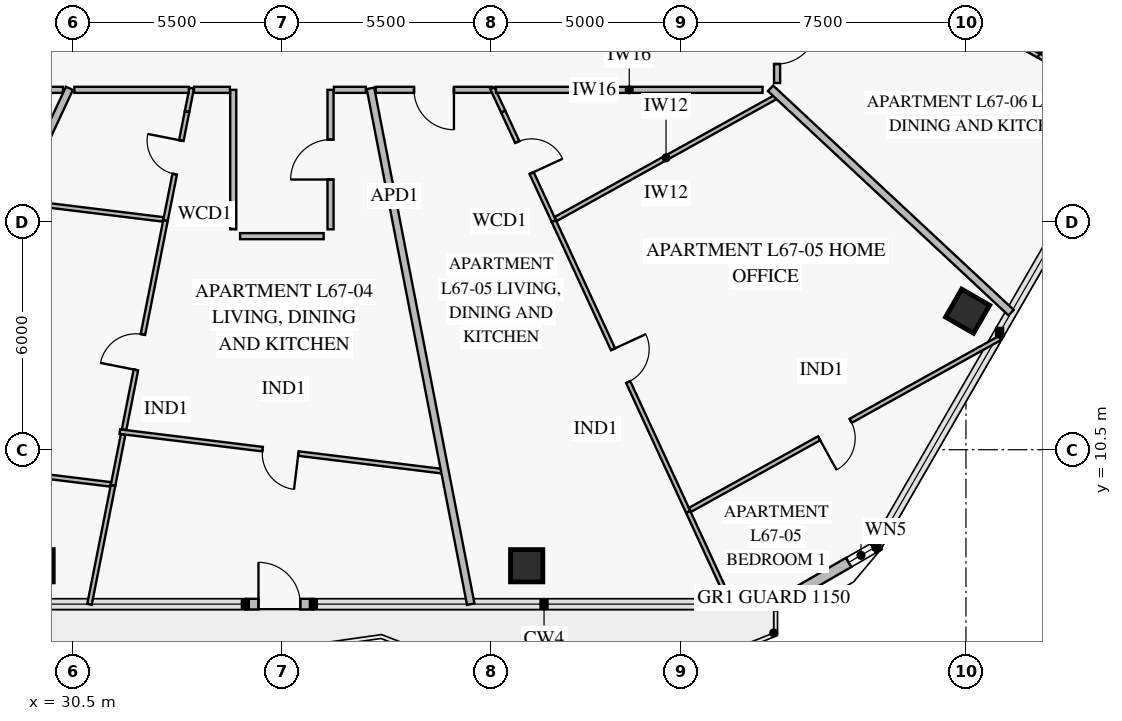
"""IFC4 building model, lengths in metres.
Left out: names, types, materials, properties, quantities, classifications, styles, units other than length and angle.
Written with IfcOpenShell. Run it as: python <this file> out.ifc"""

import sys

from ifc_helpers import new_model, si_unit, direction, frame, frame_2d, origin, origin_2d, place, context, subcontext, project, spatial, rectangle, extrude, element, fill, save


model = new_model("IFC4")
c1 = context("Model", 3, precision=1e-05, world=origin(), true_north=direction((0.0, 1.0)))
c2 = subcontext(c1, "Body", "Model", "MODEL_VIEW")
j1 = project(units=[si_unit("LENGTHUNIT", "METRE"), si_unit("PLANEANGLEUNIT", "RADIAN")], contexts=[c1])
p1 = place(None, origin())
s1 = spatial("IfcSite", under=j1, at=p1, CompositionType="ELEMENT")
p2 = place(p1, origin())
s2 = spatial("IfcBuilding", under=s1, at=p2, CompositionType="ELEMENT")
p3 = place(p2, frame((0.0, 0.0, 265.4)))
s3 = spatial("IfcBuildingStorey", under=s2, at=p3, CompositionType="ELEMENT", Elevation=265.4)
for number, where, z_axis, x_axis in (
    (1, (29.559, 7.446, 0.0), (0.0, 0.0, 1.0), (1.0, 0.0, 0.0)),
    (2, (42.441, 7.446, 0.0), (0.0, 0.0, 1.0), (1.0, 0.0, 0.0)),
    (3, (54.044, 14.145, 0.0), (0.0, 0.0, 1.0), (0.5, 0.866, 0.0)),
):
    element("IfcColumn", number, at=place(p3, frame(where, z_axis=z_axis, x_axis=x_axis)), inside=s3, PredefinedType="COLUMN", context=c2, shape_type="SweptSolid", body=[
        extrude(rectangle(XDim=0.85, YDim=0.85, at=origin_2d()), origin(), (0.0, 0.0, 1.0), 3.55),
    ])
p4 = place(p3, frame((51.715, 7.996, 0.0), z_axis=(0.0, 0.0, 1.0), x_axis=(-0.866028773314, -0.499994163758, 0.0)))
e4 = element("IfcWall", 4, at=p4, inside=s3, PredefinedType="SOLIDWALL", context=c2, shape_type="SweptSolid", body=[
    extrude(rectangle(XDim=3.215, YDim=0.28, at=frame_2d((1.607, 0.0))), origin(), (0.0, 0.0, 1.0), 3.55),
])
p5 = place(p4, frame((0.176, 0.0, 0.85)))
e5 = element("IfcOpeningElement", 5, at=p5, cuts=e4, PredefinedType="OPENING", context=c2, shape_type="SweptSolid", body=[
    extrude(rectangle(XDim=0.75, YDim=1.5, at=frame_2d((0.375, 0.75))), frame((0.0, 0.152, 0.0), z_axis=(0.0, -1.0, 0.0), x_axis=(1.0, 0.0, 0.0)), (0.0, 0.0, 1.0), 0.304),
])
p6 = place(p3, frame((36.829, 6.436, 0.0), z_axis=(0.0, 0.0, 1.0), x_axis=(-1.0, 0.0, 0.0)))
e6 = element("IfcWall", 6, at=p6, inside=s3, PredefinedType="SOLIDWALL", context=c2, shape_type="SweptSolid", body=[
    extrude(rectangle(XDim=1.79, YDim=0.28, at=frame_2d((0.895, 0.0))), origin(), (0.0, 0.0, 1.0), 3.55),
])
p7 = place(p6, frame((0.345, 0.0, 0.0)))
e7 = element("IfcOpeningElement", 7, at=p7, cuts=e6, PredefinedType="OPENING", context=c2, shape_type="SweptSolid", body=[
    extrude(rectangle(XDim=1.1, YDim=2.2, at=frame_2d((0.55, 1.1))), frame((0.0, 0.152, 0.0), z_axis=(0.0, -1.0, 0.0), x_axis=(1.0, 0.0, 0.0)), (0.0, 0.0, 1.0), 0.304),
])
p8 = place(p3, frame((23.15, 19.97, 0.0), z_axis=(0.0, 0.0, 1.0), x_axis=(1.0, 0.0, 0.0)))
e8 = element("IfcWall", 8, at=p8, inside=s3, PredefinedType="PARTITIONING", context=c2, shape_type="SweptSolid", body=[
    extrude(rectangle(XDim=7.09, YDim=0.16, at=frame_2d((3.545, 0.0))), origin(), (0.0, 0.0, 1.0), 2.95),
])
p9 = place(p8, frame((3.02, 0.0, 0.0)))
e9 = element("IfcOpeningElement", 9, at=p9, cuts=e8, PredefinedType="OPENING", context=c2, shape_type="SweptSolid", body=[
    extrude(rectangle(XDim=1.05, YDim=2.15, at=frame_2d((0.525, 1.075))), frame((0.0, 0.092, 0.0), z_axis=(0.0, -1.0, 0.0), x_axis=(1.0, 0.0, 0.0)), (0.0, 0.0, 1.0), 0.184),
])
p10 = place(p3, frame((31.735, 10.976, 0.0), z_axis=(0.0, 0.0, 1.0), x_axis=(0.992544489296, -0.121882881359, 0.0)))
e10 = element("IfcWall", 10, at=p10, inside=s3, PredefinedType="PARTITIONING", context=c2, shape_type="SweptSolid", body=[
    extrude(rectangle(XDim=8.519, YDim=0.12, at=frame_2d((4.26, 0.0))), origin(), (0.0, 0.0, 1.0), 3.55),
])
p11 = place(p10, frame((3.784, 0.0, 0.0)))
e11 = element("IfcOpeningElement", 11, at=p11, cuts=e10, PredefinedType="OPENING", context=c2, shape_type="SweptSolid", body=[
    extrude(rectangle(XDim=0.95, YDim=2.1, at=frame_2d((0.475, 1.05))), frame((0.0, 0.072, 0.0), z_axis=(0.0, -1.0, 0.0), x_axis=(1.0, 0.0, 0.0)), (0.0, 0.0, 1.0), 0.144),
])
p12 = place(p3, frame((33.505, 19.4, 0.0), z_axis=(0.0, 0.0, 1.0), x_axis=(-0.194223379767, -0.980957327692, 0.0)))
e12 = element("IfcWall", 12, at=p12, inside=s3, PredefinedType="PARTITIONING", context=c2, shape_type="SweptSolid", body=[
    extrude(rectangle(XDim=2.927, YDim=0.12, at=frame_2d((1.464, 0.0))), origin(), (0.0, 0.0, 1.0), 3.55),
])
p13 = place(p12, frame((0.78, 0.0, 0.0)))
e13 = element("IfcOpeningElement", 13, at=p13, cuts=e12, PredefinedType="OPENING", context=c2, shape_type="SweptSolid", body=[
    extrude(rectangle(XDim=0.9, YDim=2.1, at=frame_2d((0.45, 1.05))), frame((0.0, 0.072, 0.0), z_axis=(0.0, -1.0, 0.0), x_axis=(1.0, 0.0, 0.0)), (0.0, 0.0, 1.0), 0.144),
])
p14 = place(p3, frame((32.937, 16.528, 0.0), z_axis=(0.0, 0.0, 1.0), x_axis=(-0.194255896186, -0.980950889085, 0.0)))
e14 = element("IfcWall", 14, at=p14, inside=s3, PredefinedType="PARTITIONING", context=c2, shape_type="SweptSolid", body=[
    extrude(rectangle(XDim=5.604, YDim=0.12, at=frame_2d((2.802, 0.0))), origin(), (0.0, 0.0, 1.0), 3.15),
])
p15 = place(p14, frame((3.054, 0.0, 0.0)))
e15 = element("IfcOpeningElement", 15, at=p15, cuts=e14, PredefinedType="OPENING", context=c2, shape_type="SweptSolid", body=[
    extrude(rectangle(XDim=0.95, YDim=2.1, at=frame_2d((0.475, 1.05))), frame((0.0, 0.072, 0.0), z_axis=(0.0, -1.0, 0.0), x_axis=(1.0, 0.0, 0.0)), (0.0, 0.0, 1.0), 0.144),
])
p16 = place(p3, frame((31.822, 10.897, 0.0), z_axis=(0.0, 0.0, 1.0), x_axis=(-0.194227600247, -0.980956492054, 0.0)))
e16 = element("IfcWall", 16, at=p16, inside=s3, PredefinedType="PARTITIONING", context=c2, shape_type="SweptSolid", body=[
    extrude(rectangle(XDim=1.368, YDim=0.12, at=frame_2d((0.684, 0.0))), origin(), (0.0, 0.0, 1.0), 3.55),
])
p17 = place(p3, frame((25.985, 10.265, 0.0), z_axis=(0.0, 0.0, 1.0), x_axis=(0.992542241385, -0.121901185661, 0.0)))
e17 = element("IfcWall", 17, at=p17, inside=s3, PredefinedType="PARTITIONING", context=c2, shape_type="SweptSolid", body=[
    extrude(rectangle(XDim=5.55, YDim=0.12, at=frame_2d((2.775, 0.0))), origin(), (0.0, 0.0, 1.0), 2.95),
])
p18 = place(p17, frame((2.384, 0.0, 0.0)))
e18 = element("IfcOpeningElement", 18, at=p18, cuts=e17, PredefinedType="OPENING", context=c2, shape_type="SweptSolid", body=[
    extrude(rectangle(XDim=0.95, YDim=2.1, at=frame_2d((0.475, 1.05))), frame((0.0, 0.072, 0.0), z_axis=(0.0, -1.0, 0.0), x_axis=(1.0, 0.0, 0.0)), (0.0, 0.0, 1.0), 0.144),
])
p19 = place(p3, frame((37.28, 16.3, 0.0), z_axis=(0.0, 0.0, 1.0), x_axis=(0.0, 1.0, 0.0)))
e19 = element("IfcWall", 19, at=p19, inside=s3, PredefinedType="PARTITIONING", context=c2, shape_type="SweptSolid", body=[
    extrude(rectangle(XDim=3.67, YDim=0.16, at=frame_2d((1.835, 0.0))), origin(), (0.0, 0.0, 1.0), 3.55),
])
p20 = place(p19, frame((1.31, 0.0, 0.0)))
e20 = element("IfcOpeningElement", 20, at=p20, cuts=e19, PredefinedType="OPENING", context=c2, shape_type="SweptSolid", body=[
    extrude(rectangle(XDim=1.05, YDim=2.15, at=frame_2d((0.525, 1.075))), frame((0.0, 0.092, 0.0), z_axis=(0.0, -1.0, 0.0), x_axis=(1.0, 0.0, 0.0)), (0.0, 0.0, 1.0), 0.184),
])
p21 = place(p3, frame((41.822, 19.4, 0.0), z_axis=(0.0, 0.0, 1.0), x_axis=(0.419438119549, -0.907783930167, 0.0)))
e21 = element("IfcWall", 21, at=p21, inside=s3, PredefinedType="PARTITIONING", context=c2, shape_type="SweptSolid", body=[
    extrude(rectangle(XDim=3.178, YDim=0.12, at=frame_2d((1.589, 0.0))), origin(), (0.0, 0.0, 1.0), 3.55),
])
p22 = place(p21, frame((0.885, 0.0, 0.0)))
e22 = element("IfcOpeningElement", 22, at=p22, cuts=e21, PredefinedType="OPENING", context=c2, shape_type="SweptSolid", body=[
    extrude(rectangle(XDim=0.9, YDim=2.1, at=frame_2d((0.45, 1.05))), frame((0.0, 0.072, 0.0), z_axis=(0.0, -1.0, 0.0), x_axis=(1.0, 0.0, 0.0)), (0.0, 0.0, 1.0), 0.144),
])
p23 = place(p3, frame((43.155, 16.515, 0.0), z_axis=(0.0, 0.0, 1.0), x_axis=(0.419453006553, -0.907777051535, 0.0)))
e23 = element("IfcWall", 23, at=p23, inside=s3, PredefinedType="PARTITIONING", context=c2, shape_type="SweptSolid", body=[
    extrude(rectangle(XDim=8.43, YDim=0.12, at=frame_2d((4.215, 0.0))), origin(), (0.0, 0.0, 1.0), 2.93),
])
p24 = place(p23, frame((3.715, 0.0, 0.0)))
e24 = element("IfcOpeningElement", 24, at=p24, cuts=e23, PredefinedType="OPENING", context=c2, shape_type="SweptSolid", body=[
    extrude(rectangle(XDim=0.95, YDim=2.1, at=frame_2d((0.475, 1.05))), frame((0.0, 0.072, 0.0), z_axis=(0.0, -1.0, 0.0), x_axis=(1.0, 0.0, 0.0)), (0.0, 0.0, 1.0), 0.144),
])
p25 = place(p3, frame((46.74, 8.918, 0.0), z_axis=(0.0, 0.0, 1.0), x_axis=(0.874617638419, 0.484813352298, 0.0)))
e25 = element("IfcWall", 25, at=p25, inside=s3, PredefinedType="PARTITIONING", context=c2, shape_type="SweptSolid", body=[
    extrude(rectangle(XDim=9.323, YDim=0.12, at=frame_2d((4.661, 0.0))), origin(), (0.0, 0.0, 1.0), 3.55),
])
p26 = place(p25, frame((3.882, 0.0, 0.0)))
e26 = element("IfcOpeningElement", 26, at=p26, cuts=e25, PredefinedType="OPENING", context=c2, shape_type="SweptSolid", body=[
    extrude(rectangle(XDim=0.95, YDim=2.1, at=frame_2d((0.475, 1.05))), frame((0.0, 0.072, 0.0), z_axis=(0.0, -1.0, 0.0), x_axis=(1.0, 0.0, 0.0)), (0.0, 0.0, 1.0), 0.144),
])
p27 = place(p3, frame((38.468, 19.97, 0.0), z_axis=(0.0, 0.0, 1.0), x_axis=(1.0, 0.0, 0.0)))
e27 = element("IfcWall", 27, at=p27, inside=s3, PredefinedType="PARTITIONING", context=c2, shape_type="SweptSolid", body=[
    extrude(rectangle(XDim=3.069, YDim=0.16, at=frame_2d((1.534, 0.0))), origin(), (0.0, 0.0, 1.0), 2.95),
])
p28 = place(p27, frame((1.009, 0.0, 0.0)))
e28 = element("IfcOpeningElement", 28, at=p28, cuts=e27, PredefinedType="OPENING", context=c2, shape_type="SweptSolid", body=[
    extrude(rectangle(XDim=1.05, YDim=2.15, at=frame_2d((0.525, 1.075))), frame((0.0, 0.092, 0.0), z_axis=(0.0, -1.0, 0.0), x_axis=(1.0, 0.0, 0.0)), (0.0, 0.0, 1.0), 0.184),
])
p29 = place(p3, frame((48.472, 25.03, 0.0), z_axis=(0.0, 0.0, 1.0), x_axis=(0.872916935633, -0.487868858901, 0.0)))
e29 = element("IfcWall", 29, at=p29, inside=s3, PredefinedType="PARTITIONING", context=c2, shape_type="SweptSolid", body=[
    extrude(rectangle(XDim=8.524, YDim=0.12, at=frame_2d((4.262, 0.0))), origin(), (0.0, 0.0, 1.0), 3.15),
])
p30 = place(p29, frame((3.762, 0.0, 0.0)))
e30 = element("IfcOpeningElement", 30, at=p30, cuts=e29, PredefinedType="OPENING", context=c2, shape_type="SweptSolid", body=[
    extrude(rectangle(XDim=0.95, YDim=2.1, at=frame_2d((0.475, 1.05))), frame((0.0, 0.072, 0.0), z_axis=(0.0, -1.0, 0.0), x_axis=(1.0, 0.0, 0.0)), (0.0, 0.0, 1.0), 0.144),
])
p31 = place(p3, frame((55.92, 20.945, 0.0), z_axis=(0.0, 0.0, 1.0), x_axis=(0.422606705523, 0.9063131757, 0.0)))
e31 = element("IfcWall", 31, at=p31, inside=s3, PredefinedType="PARTITIONING", context=c2, shape_type="SweptSolid", body=[
    extrude(rectangle(XDim=8.871, YDim=0.12, at=frame_2d((4.435, 0.0))), origin(), (0.0, 0.0, 1.0), 2.95),
])
p32 = place(p31, frame((3.876, 0.0, 0.0)))
e32 = element("IfcOpeningElement", 32, at=p32, cuts=e31, PredefinedType="OPENING", context=c2, shape_type="SweptSolid", body=[
    extrude(rectangle(XDim=0.95, YDim=2.1, at=frame_2d((0.475, 1.05))), frame((0.0, 0.072, 0.0), z_axis=(0.0, -1.0, 0.0), x_axis=(1.0, 0.0, 0.0)), (0.0, 0.0, 1.0), 0.144),
])
p33 = place(p3, frame((49.03, 20.15, 0.0), z_axis=(0.0, 0.0, 1.0), x_axis=(0.0, 1.0, 0.0)))
e33 = element("IfcWall", 33, at=p33, inside=s3, PredefinedType="PARTITIONING", context=c2, shape_type="SweptSolid", body=[
    extrude(rectangle(XDim=2.05, YDim=0.16, at=frame_2d((1.025, 0.0))), origin(), (0.0, 0.0, 1.0), 3.55),
])
p34 = place(p33, frame((0.5, 0.0, 0.0)))
e34 = element("IfcOpeningElement", 34, at=p34, cuts=e33, PredefinedType="OPENING", context=c2, shape_type="SweptSolid", body=[
    extrude(rectangle(XDim=1.05, YDim=2.15, at=frame_2d((0.525, 1.075))), frame((0.0, 0.092, 0.0), z_axis=(0.0, -1.0, 0.0), x_axis=(1.0, 0.0, 0.0)), (0.0, 0.0, 1.0), 0.184),
])
p35 = place(p3, frame((30.409, 20.01, 0.0), z_axis=(0.0, 0.0, 1.0), x_axis=(-0.422607909104, -0.906312614479, 0.0)))
e35 = element("IfcWall", 35, at=p35, inside=s3, PredefinedType="PARTITIONING", context=c2, shape_type="SweptSolid", body=[
    extrude(rectangle(XDim=14.977, YDim=0.2, at=frame_2d((7.488, 0.0))), origin(), (0.0, 0.0, 1.0), 2.93),
])
p36 = place(p3, frame((33.627, 20.014, 0.0), z_axis=(0.0, 0.0, 1.0), x_axis=(-0.194092051537, -0.98098332072, 0.0)))
e36 = element("IfcWall", 36, at=p36, inside=s3, PredefinedType="PARTITIONING", context=c2, shape_type="SweptSolid", body=[
    extrude(rectangle(XDim=0.626, YDim=0.12, at=frame_2d((0.313, 0.0))), origin(), (0.0, 0.0, 1.0), 3.55),
])
p37 = place(p3, frame((31.556, 9.555, 0.0), z_axis=(0.0, 0.0, 1.0), x_axis=(-0.19425823532, -0.980950425868, 0.0)))
e37 = element("IfcWall", 37, at=p37, inside=s3, PredefinedType="PARTITIONING", context=c2, shape_type="SweptSolid", body=[
    extrude(rectangle(XDim=3.185, YDim=0.12, at=frame_2d((1.592, 0.0))), origin(), (0.0, 0.0, 1.0), 2.93),
])
p38 = place(p3, frame((29.134, 17.02, 0.0), z_axis=(0.0, 0.0, 1.0), x_axis=(0.992545655443, -0.121873384548, 0.0)))
e38 = element("IfcWall", 38, at=p38, inside=s3, PredefinedType="PARTITIONING", context=c2, shape_type="SweptSolid", body=[
    extrude(rectangle(XDim=3.768, YDim=0.12, at=frame_2d((1.884, 0.0))), origin(), (0.0, 0.0, 1.0), 2.95),
])
p39 = place(p3, frame((38.331, 20.01, 0.0), z_axis=(0.0, 0.0, 1.0), x_axis=(0.190806334077, -0.981627700748, 0.0)))
e39 = element("IfcWall", 39, at=p39, inside=s3, PredefinedType="PARTITIONING", context=c2, shape_type="SweptSolid", body=[
    extrude(rectangle(XDim=13.828, YDim=0.2, at=frame_2d((6.914, 0.0))), origin(), (0.0, 0.0, 1.0), 2.93),
])
p40 = place(p3, frame((41.539, 20.013, 0.0), z_axis=(0.0, 0.0, 1.0), x_axis=(0.419516805105, -0.907747569666, 0.0)))
e40 = element("IfcWall", 40, at=p40, inside=s3, PredefinedType="PARTITIONING", context=c2, shape_type="SweptSolid", body=[
    extrude(rectangle(XDim=0.675, YDim=0.12, at=frame_2d((0.337, 0.0))), origin(), (0.0, 0.0, 1.0), 3.55),
])
p41 = place(p3, frame((46.691, 8.863, 0.0), z_axis=(0.0, 0.0, 1.0), x_axis=(0.419509024285, -0.907751165542, 0.0)))
e41 = element("IfcWall", 41, at=p41, inside=s3, PredefinedType="PARTITIONING", context=c2, shape_type="SweptSolid", body=[
    extrude(rectangle(XDim=2.678, YDim=0.12, at=frame_2d((1.339, 0.0))), origin(), (0.0, 0.0, 1.0), 3.55),
])
p42 = place(p3, frame((43.204, 16.571, 0.0), z_axis=(0.0, 0.0, 1.0), x_axis=(0.874626847506, 0.48479673846, 0.0)))
e42 = element("IfcWall", 42, at=p42, inside=s3, PredefinedType="PARTITIONING", context=c2, shape_type="SweptSolid", body=[
    extrude(rectangle(XDim=6.64, YDim=0.12, at=frame_2d((3.32, 0.0))), origin(), (0.0, 0.0, 1.0), 2.95),
])
p43 = place(p3, frame((48.857, 20.01, 0.0), z_axis=(0.0, 0.0, 1.0), x_axis=(0.731342217011, -0.682010675589, 0.0)))
e43 = element("IfcWall", 43, at=p43, inside=s3, PredefinedType="PARTITIONING", context=c2, shape_type="SweptSolid", body=[
    extrude(rectangle(XDim=8.656, YDim=0.2, at=frame_2d((4.328, 0.0))), origin(), (0.0, 0.0, 1.0), 2.93),
])
p44 = place(p3, frame((55.913, 20.871, 0.0), z_axis=(0.0, 0.0, 1.0), x_axis=(0.872940157906, -0.487827306242, 0.0)))
e44 = element("IfcWall", 44, at=p44, inside=s3, PredefinedType="PARTITIONING", context=c2, shape_type="SweptSolid", body=[
    extrude(rectangle(XDim=2.76, YDim=0.12, at=frame_2d((1.38, 0.0))), origin(), (0.0, 0.0, 1.0), 2.93),
])
p45 = place(p3, frame((34.72, 19.97, 0.0), z_axis=(0.0, 0.0, 1.0), x_axis=(0.0, -1.0, 0.0)))
e45 = element("IfcWall", 45, at=p45, inside=s3, PredefinedType="PARTITIONING", context=c2, shape_type="SweptSolid", body=[
    extrude(rectangle(XDim=3.67, YDim=0.16, at=frame_2d((1.835, 0.0))), origin(), (0.0, 0.0, 1.0), 3.55),
])
p46 = place(p3, frame((34.9, 16.12, 0.0), z_axis=(0.0, 0.0, 1.0), x_axis=(1.0, 0.0, 0.0)))
e46 = element("IfcWall", 46, at=p46, inside=s3, PredefinedType="PARTITIONING", context=c2, shape_type="SweptSolid", body=[
    extrude(rectangle(XDim=2.2, YDim=0.16, at=frame_2d((1.1, 0.0))), origin(), (0.0, 0.0, 1.0), 3.55),
])
p47 = place(p3, frame((33.687, 19.97, 0.0), z_axis=(0.0, 0.0, 1.0), x_axis=(1.0, 0.0, 0.0)))
e47 = element("IfcWall", 47, at=p47, inside=s3, PredefinedType="PARTITIONING", context=c2, shape_type="SweptSolid", body=[
    extrude(rectangle(XDim=0.945, YDim=0.16, at=frame_2d((0.472, 0.0))), origin(), (0.0, 0.0, 1.0), 3.55),
])
p48 = place(p3, frame((37.368, 19.97, 0.0), z_axis=(0.0, 0.0, 1.0), x_axis=(1.0, 0.0, 0.0)))
e48 = element("IfcWall", 48, at=p48, inside=s3, PredefinedType="PARTITIONING", context=c2, shape_type="SweptSolid", body=[
    extrude(rectangle(XDim=0.841, YDim=0.16, at=frame_2d((0.421, 0.0))), origin(), (0.0, 0.0, 1.0), 3.55),
])
p49 = place(p3, frame((30.54, 19.97, 0.0), z_axis=(0.0, 0.0, 1.0), x_axis=(1.0, 0.0, 0.0)))
e49 = element("IfcWall", 49, at=p49, inside=s3, PredefinedType="PARTITIONING", context=c2, shape_type="SweptSolid", body=[
    extrude(rectangle(XDim=3.009, YDim=0.16, at=frame_2d((1.504, 0.0))), origin(), (0.0, 0.0, 1.0), 2.95),
])
p50 = place(p3, frame((41.634, 19.97, 0.0), z_axis=(0.0, 0.0, 1.0), x_axis=(1.0, 0.0, 0.0)))
e50 = element("IfcWall", 50, at=p50, inside=s3, PredefinedType="PARTITIONING", context=c2, shape_type="SweptSolid", body=[
    extrude(rectangle(XDim=7.014, YDim=0.16, at=frame_2d((3.507, 0.0))), origin(), (0.0, 0.0, 1.0), 2.95),
])
p51 = place(p5, origin())
e51 = element("IfcWindow", 51, at=p51, inside=s3, PartitioningType="SINGLE_PANEL", PredefinedType="WINDOW", context=c2, shape_type="SweptSolid", body=[
    extrude(rectangle(XDim=0.75, YDim=1.5, at=frame_2d((0.375, 0.75))), frame((0.0, 0.03, 0.0), z_axis=(0.0, -1.0, 0.0), x_axis=(1.0, 0.0, 0.0)), (0.0, 0.0, 1.0), 0.06),
])
fill(e5, e51)
p52 = place(p7, frame((1.1, 0.0, 0.0), z_axis=(0.0, 0.0, 1.0), x_axis=(-1.0, 0.0, 0.0)))
e52 = element("IfcDoor", 52, at=p52, inside=s3, OperationType="SINGLE_SWING_LEFT", PredefinedType="DOOR", context=c2, shape_type="SweptSolid", body=[
    extrude(rectangle(XDim=1.1, YDim=2.2, at=frame_2d((0.55, 1.1))), frame((0.0, 0.025, 0.0), z_axis=(0.0, -1.0, 0.0), x_axis=(1.0, 0.0, 0.0)), (0.0, 0.0, 1.0), 0.05),
])
fill(e7, e52)
p53 = place(p11, frame((0.95, 0.0, 0.0), z_axis=(0.0, 0.0, 1.0), x_axis=(-1.0, 0.0, 0.0)))
e53 = element("IfcDoor", 53, at=p53, inside=s3, OperationType="SINGLE_SWING_LEFT", PredefinedType="DOOR", context=c2, shape_type="SweptSolid", body=[
    extrude(rectangle(XDim=0.95, YDim=2.1, at=frame_2d((0.475, 1.05))), frame((0.0, 0.025, 0.0), z_axis=(0.0, -1.0, 0.0), x_axis=(1.0, 0.0, 0.0)), (0.0, 0.0, 1.0), 0.05),
])
fill(e11, e53)
p54 = place(p13, frame((0.9, 0.0, 0.0), z_axis=(0.0, 0.0, 1.0), x_axis=(-1.0, 0.0, 0.0)))
e54 = element("IfcDoor", 54, at=p54, inside=s3, OperationType="SINGLE_SWING_RIGHT", PredefinedType="DOOR", context=c2, shape_type="SweptSolid", body=[
    extrude(rectangle(XDim=0.9, YDim=2.1, at=frame_2d((0.45, 1.05))), frame((0.0, 0.025, 0.0), z_axis=(0.0, -1.0, 0.0), x_axis=(1.0, 0.0, 0.0)), (0.0, 0.0, 1.0), 0.05),
])
fill(e13, e54)
p55 = place(p15, frame((0.95, 0.0, 0.0), z_axis=(0.0, 0.0, 1.0), x_axis=(-1.0, 0.0, 0.0)))
e55 = element("IfcDoor", 55, at=p55, inside=s3, OperationType="SINGLE_SWING_LEFT", PredefinedType="DOOR", context=c2, shape_type="SweptSolid", body=[
    extrude(rectangle(XDim=0.95, YDim=2.1, at=frame_2d((0.475, 1.05))), frame((0.0, 0.025, 0.0), z_axis=(0.0, -1.0, 0.0), x_axis=(1.0, 0.0, 0.0)), (0.0, 0.0, 1.0), 0.05),
])
fill(e15, e55)
p56 = place(p20, origin())
e56 = element("IfcDoor", 56, at=p56, inside=s3, OperationType="SINGLE_SWING_LEFT", PredefinedType="DOOR", context=c2, shape_type="SweptSolid", body=[
    extrude(rectangle(XDim=1.05, YDim=2.15, at=frame_2d((0.525, 1.075))), frame((0.0, 0.025, 0.0), z_axis=(0.0, -1.0, 0.0), x_axis=(1.0, 0.0, 0.0)), (0.0, 0.0, 1.0), 0.05),
])
fill(e20, e56)
p57 = place(p22, origin())
e57 = element("IfcDoor", 57, at=p57, inside=s3, OperationType="SINGLE_SWING_RIGHT", PredefinedType="DOOR", context=c2, shape_type="SweptSolid", body=[
    extrude(rectangle(XDim=0.9, YDim=2.1, at=frame_2d((0.45, 1.05))), frame((0.0, 0.025, 0.0), z_axis=(0.0, -1.0, 0.0), x_axis=(1.0, 0.0, 0.0)), (0.0, 0.0, 1.0), 0.05),
])
fill(e22, e57)
p58 = place(p24, origin())
e58 = element("IfcDoor", 58, at=p58, inside=s3, OperationType="SINGLE_SWING_LEFT", PredefinedType="DOOR", context=c2, shape_type="SweptSolid", body=[
    extrude(rectangle(XDim=0.95, YDim=2.1, at=frame_2d((0.475, 1.05))), frame((0.0, 0.025, 0.0), z_axis=(0.0, -1.0, 0.0), x_axis=(1.0, 0.0, 0.0)), (0.0, 0.0, 1.0), 0.05),
])
fill(e24, e58)
p59 = place(p26, frame((0.95, 0.0, 0.0), z_axis=(0.0, 0.0, 1.0), x_axis=(-1.0, 0.0, 0.0)))
e59 = element("IfcDoor", 59, at=p59, inside=s3, OperationType="SINGLE_SWING_RIGHT", PredefinedType="DOOR", context=c2, shape_type="SweptSolid", body=[
    extrude(rectangle(XDim=0.95, YDim=2.1, at=frame_2d((0.475, 1.05))), frame((0.0, 0.025, 0.0), z_axis=(0.0, -1.0, 0.0), x_axis=(1.0, 0.0, 0.0)), (0.0, 0.0, 1.0), 0.05),
])
fill(e26, e59)
p60 = place(p28, frame((1.05, 0.0, 0.0), z_axis=(0.0, 0.0, 1.0), x_axis=(-1.0, 0.0, 0.0)))
e60 = element("IfcDoor", 60, at=p60, inside=s3, OperationType="SINGLE_SWING_LEFT", PredefinedType="DOOR", context=c2, shape_type="SweptSolid", body=[
    extrude(rectangle(XDim=1.05, YDim=2.15, at=frame_2d((0.525, 1.075))), frame((0.0, 0.025, 0.0), z_axis=(0.0, -1.0, 0.0), x_axis=(1.0, 0.0, 0.0)), (0.0, 0.0, 1.0), 0.05),
])
fill(e28, e60)
p61 = place(p34, frame((1.05, 0.0, 0.0), z_axis=(0.0, 0.0, 1.0), x_axis=(-1.0, 0.0, 0.0)))
e61 = element("IfcDoor", 61, at=p61, inside=s3, OperationType="SINGLE_SWING_LEFT", PredefinedType="DOOR", context=c2, shape_type="SweptSolid", body=[
    extrude(rectangle(XDim=1.05, YDim=2.15, at=frame_2d((0.525, 1.075))), frame((0.0, 0.025, 0.0), z_axis=(0.0, -1.0, 0.0), x_axis=(1.0, 0.0, 0.0)), (0.0, 0.0, 1.0), 0.05),
])
fill(e34, e61)
save(model, sys.argv[1])
